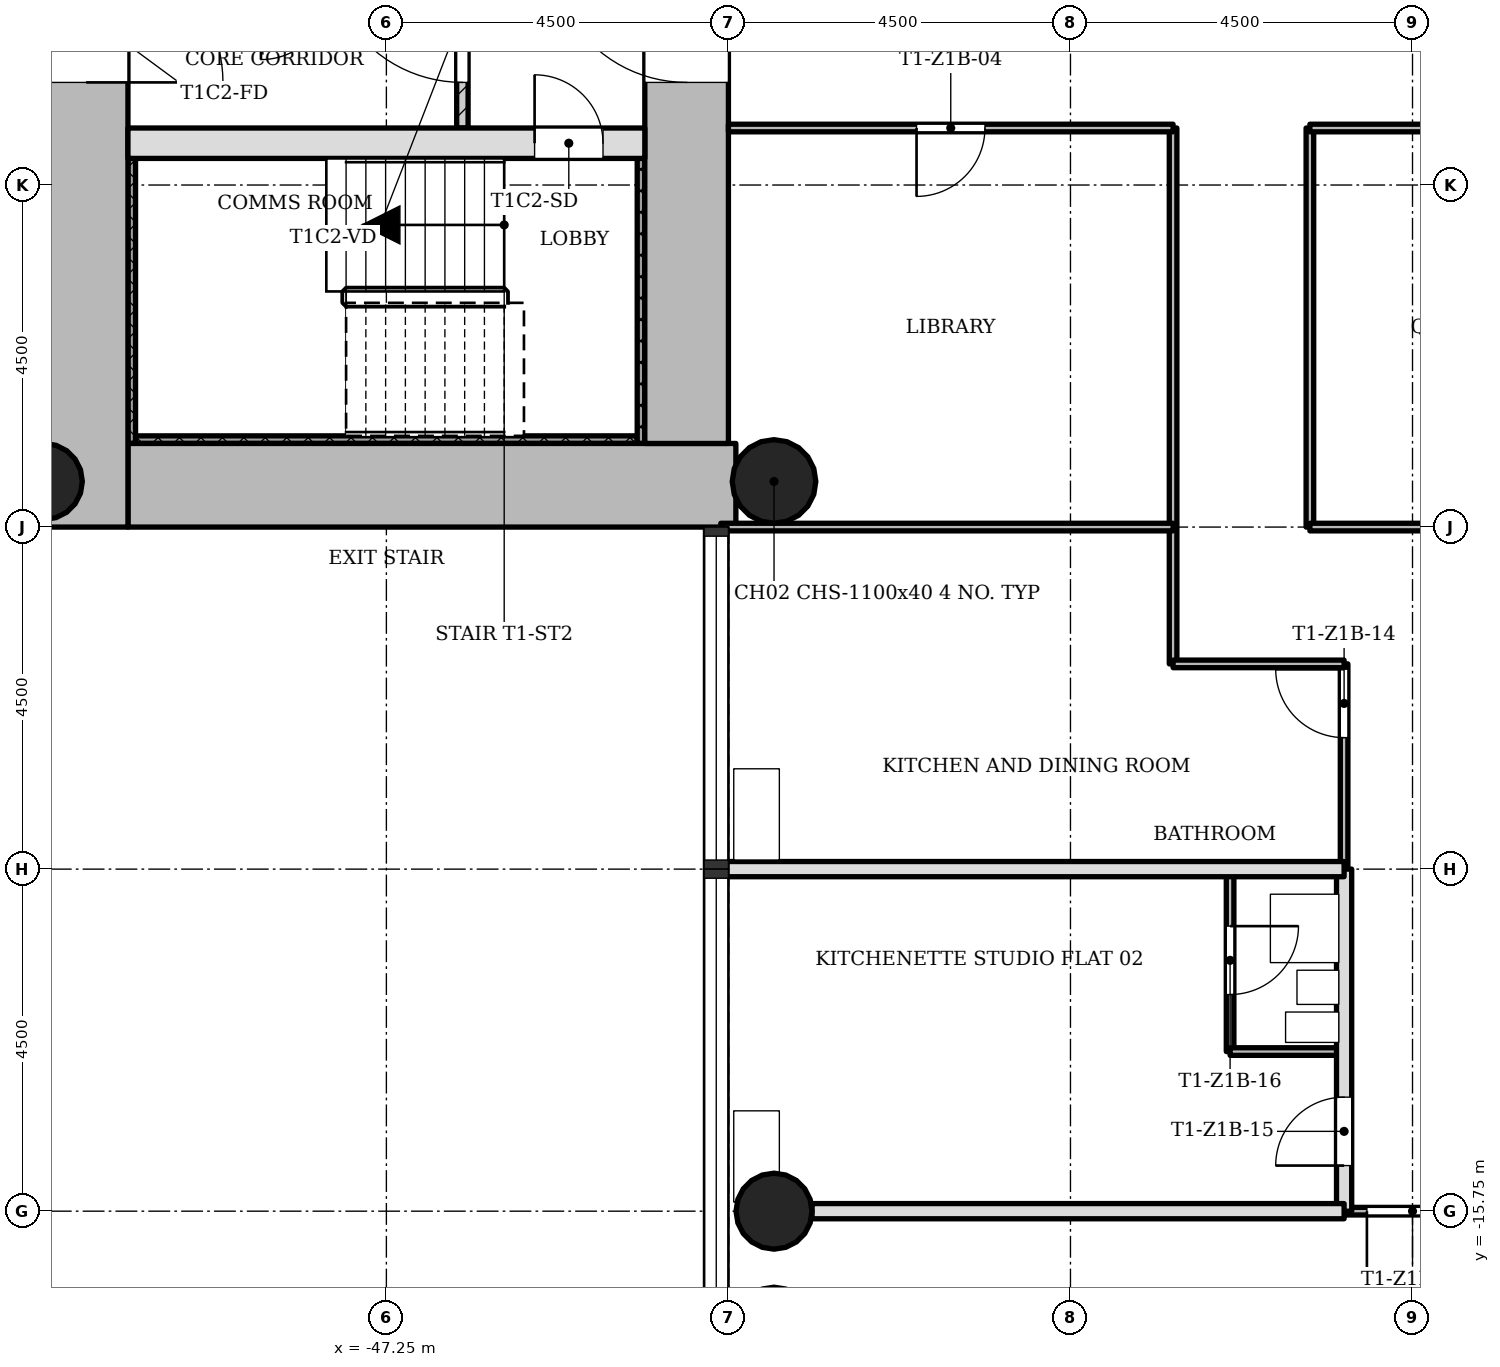
"""IFC4 building model, lengths in metres.
Left out: names, types, materials, properties, quantities, classifications, styles, units other than length and angle.
Written with IfcOpenShell. Run it as: python <this file> out.ifc"""

import sys

from ifc_helpers import new_model, si_unit, direction, frame, frame_2d, origin, origin_2d, place, context, subcontext, project, spatial, rectangle, hollow_circle, extrude, element, fill, save


model = new_model("IFC4")
c1 = context("Model", 3, precision=1e-05, world=origin(), true_north=direction((0.0, 1.0)))
c2 = subcontext(c1, "Body", "Model", "MODEL_VIEW")
j1 = project(units=[si_unit("LENGTHUNIT", "METRE"), si_unit("PLANEANGLEUNIT", "RADIAN")], contexts=[c1])
p1 = place(None, origin())
s1 = spatial("IfcSite", under=j1, at=p1, CompositionType="ELEMENT")
p2 = place(p1, origin())
s2 = spatial("IfcBuilding", under=s1, at=p2, CompositionType="ELEMENT")
p3 = place(p2, frame((0.0, 0.0, 41.5)))
s3 = spatial("IfcBuildingStorey", under=s2, at=p3, CompositionType="ELEMENT", Elevation=41.5)
p4 = place(p3, frame((-50.65, -6.2, 0.0), z_axis=(0.0, 0.0, 1.0), x_axis=(1.0, 0.0, 0.0)))
e1 = element("IfcWall", 1, at=p4, inside=s3, PredefinedType="SHEAR", context=c2, shape_type="SweptSolid", body=[
    extrude(rectangle(XDim=7.998, YDim=1.1, at=frame_2d((3.999, 0.0))), origin(), (0.0, 0.0, 1.0), 3.4),
])
p5 = place(p3, frame((-43.3, -5.65, 0.0), z_axis=(0.0, 0.0, 1.0), x_axis=(0.0, 1.0, 0.0)))
e2 = element("IfcWall", 2, at=p5, inside=s3, PredefinedType="SHEAR", context=c2, shape_type="SweptSolid", body=[
    extrude(rectangle(XDim=12.4, YDim=1.1, at=frame_2d((6.2, 0.0))), origin(), (0.0, 0.0, 1.0), 3.4),
])
p6 = place(p5, frame((4.75, 0.0, 0.0)))
e3 = element("IfcOpeningElement", 3, at=p6, cuts=e2, PredefinedType="OPENING", context=c2, shape_type="SweptSolid", body=[
    extrude(rectangle(XDim=1.8, YDim=2.1, at=frame_2d((0.9, 1.05))), frame((0.0, 0.56, 0.0), z_axis=(0.0, -1.0, 0.0), x_axis=(1.0, 0.0, 0.0)), (0.0, 0.0, 1.0), 1.12),
])
p7 = place(p3, frame((-51.2, 5.65, 0.0), z_axis=(0.0, 0.0, 1.0), x_axis=(0.0, -1.0, 0.0)))
e4 = element("IfcWall", 4, at=p7, inside=s3, PredefinedType="SHEAR", context=c2, shape_type="SweptSolid", body=[
    extrude(rectangle(XDim=12.4, YDim=1.1, at=frame_2d((6.2, 0.0))), origin(), (0.0, 0.0, 1.0), 3.4),
])
p8 = place(p7, frame((4.75, 0.0, 0.0)))
e5 = element("IfcOpeningElement", 5, at=p8, cuts=e4, PredefinedType="OPENING", context=c2, shape_type="SweptSolid", body=[
    extrude(rectangle(XDim=1.8, YDim=2.1, at=frame_2d((0.9, 1.05))), frame((0.0, 0.56, 0.0), z_axis=(0.0, -1.0, 0.0), x_axis=(1.0, 0.0, 0.0)), (0.0, 0.0, 1.0), 1.12),
])
p9 = place(p3, frame((-50.65, -1.7, 0.0), z_axis=(0.0, 0.0, 1.0), x_axis=(1.0, 0.0, 0.0)))
e6 = element("IfcWall", 6, at=p9, inside=s3, PredefinedType="SHEAR", context=c2, shape_type="SweptSolid", body=[
    extrude(rectangle(XDim=6.8, YDim=0.4, at=frame_2d((3.4, 0.0))), origin(), (0.0, 0.0, 1.0), 3.4),
])
p10 = place(p9, frame((5.35, 0.0, 0.0)))
e7 = element("IfcOpeningElement", 7, at=p10, cuts=e6, PredefinedType="OPENING", context=c2, shape_type="SweptSolid", body=[
    extrude(rectangle(XDim=0.9, YDim=2.1, at=frame_2d((0.45, 1.05))), frame((0.0, 0.21, 0.0), z_axis=(0.0, -1.0, 0.0), x_axis=(1.0, 0.0, 0.0)), (0.0, 0.0, 1.0), 0.42),
])
for number, where, z_axis, x_axis in (
    (8, (-51.75, -6.15, 0.0), (0.0, 0.0, 1.0), (1.0, 0.0, 0.0)),
    (9, (-42.15, -15.75, 0.0), (0.0, 0.0, 1.0), (1.0, 0.0, 0.0)),
):
    element("IfcColumn", number, at=place(p3, frame(where, z_axis=z_axis, x_axis=x_axis)), inside=s3, PredefinedType="COLUMN", context=c2, shape_type="SweptSolid", body=[
        extrude(hollow_circle(Radius=0.5, WallThickness=0.036, at=origin_2d()), origin(), (0.0, 0.0, 1.0), 3.4),
    ])
p11 = place(p3, frame((-42.15, -6.15, 0.0), z_axis=(0.0, 0.0, 1.0), x_axis=(1.0, 0.0, 0.0)))
e10 = element("IfcColumn", 10, at=p11, inside=s3, PredefinedType="COLUMN", context=c2, shape_type="SweptSolid", body=[
    extrude(hollow_circle(Radius=0.55, WallThickness=0.04, at=origin_2d()), origin(), (0.0, 0.0, 1.0), 3.4),
])
p12 = place(p3, frame((-46.25, 1.5, 0.0), z_axis=(0.0, 0.0, 1.0), x_axis=(0.0, -1.0, 0.0)))
e11 = element("IfcWall", 11, at=p12, inside=s3, PredefinedType="PARTITIONING", context=c2, shape_type="SweptSolid", body=[
    extrude(rectangle(XDim=3.0, YDim=0.15, at=frame_2d((1.5, 0.0))), origin(), (0.0, 0.0, 1.0), 3.0),
])
p13 = place(p12, frame((0.6, 0.0, 0.0)))
e12 = element("IfcOpeningElement", 12, at=p13, cuts=e11, PredefinedType="OPENING", context=c2, shape_type="SweptSolid", body=[
    extrude(rectangle(XDim=1.8, YDim=2.1, at=frame_2d((0.9, 1.05))), frame((0.0, 0.085, 0.0), z_axis=(0.0, -1.0, 0.0), x_axis=(1.0, 0.0, 0.0)), (0.0, 0.0, 1.0), 0.17),
])
p14 = place(p3, frame((-36.9, -8.55, 0.0), z_axis=(0.0, 0.0, 1.0), x_axis=(0.0, 1.0, 0.0)))
e13 = element("IfcWall", 13, at=p14, inside=s3, PredefinedType="PARTITIONING", context=c2, shape_type="SweptSolid", body=[
    extrude(rectangle(XDim=7.05, YDim=0.1, at=frame_2d((3.525, 0.0))), origin(), (0.0, 0.0, 1.0), 3.0),
])
p15 = place(p3, frame((-36.15, -13.65, 0.0), z_axis=(0.0, 0.0, 1.0), x_axis=(0.0, 1.0, 0.0)))
e14 = element("IfcWall", 14, at=p15, inside=s3, PredefinedType="PARTITIONING", context=c2, shape_type="SweptSolid", body=[
    extrude(rectangle(XDim=2.4, YDim=0.1, at=frame_2d((1.2, 0.0))), origin(), (0.0, 0.0, 1.0), 3.0),
])
p16 = place(p15, frame((0.75, 0.0, 0.0)))
e15 = element("IfcOpeningElement", 15, at=p16, cuts=e14, PredefinedType="OPENING", context=c2, shape_type="SweptSolid", body=[
    extrude(rectangle(XDim=0.9, YDim=2.1, at=frame_2d((0.45, 1.05))), frame((0.0, 0.06, 0.0), z_axis=(0.0, -1.0, 0.0), x_axis=(1.0, 0.0, 0.0)), (0.0, 0.0, 1.0), 0.12),
])
p17 = place(p3, frame((-35.1, -6.75, 0.0), z_axis=(0.0, 0.0, 1.0), x_axis=(0.0, 1.0, 0.0)))
e16 = element("IfcWall", 16, at=p17, inside=s3, PredefinedType="PARTITIONING", context=c2, shape_type="SweptSolid", body=[
    extrude(rectangle(XDim=5.25, YDim=0.1, at=frame_2d((2.625, 0.0))), origin(), (0.0, 0.0, 1.0), 3.0),
])
p18 = place(p3, frame((-34.65, -11.25, 0.0), z_axis=(0.0, 0.0, 1.0), x_axis=(0.0, 1.0, 0.0)))
e17 = element("IfcWall", 17, at=p18, inside=s3, PredefinedType="PARTITIONING", context=c2, shape_type="SweptSolid", body=[
    extrude(rectangle(XDim=2.7, YDim=0.1, at=frame_2d((1.35, 0.0))), origin(), (0.0, 0.0, 1.0), 3.0),
])
p19 = place(p18, frame((1.73, 0.0, 0.0)))
e18 = element("IfcOpeningElement", 18, at=p19, cuts=e17, PredefinedType="OPENING", context=c2, shape_type="SweptSolid", body=[
    extrude(rectangle(XDim=0.9, YDim=2.1, at=frame_2d((0.45, 1.05))), frame((0.0, 0.06, 0.0), z_axis=(0.0, -1.0, 0.0), x_axis=(1.0, 0.0, 0.0)), (0.0, 0.0, 1.0), 0.12),
])
p20 = place(p3, frame((-34.65, -15.75, 0.0), z_axis=(0.0, 0.0, 1.0), x_axis=(0.0, 1.0, 0.0)))
e19 = element("IfcWall", 19, at=p20, inside=s3, PredefinedType="SOLIDWALL", context=c2, shape_type="SweptSolid", body=[
    extrude(rectangle(XDim=4.5, YDim=0.2, at=frame_2d((2.25, 0.0))), origin(), (0.0, 0.0, 1.0), 3.0),
])
p21 = place(p20, frame((0.6, 0.0, 0.0)))
e20 = element("IfcOpeningElement", 20, at=p21, cuts=e19, PredefinedType="OPENING", context=c2, shape_type="SweptSolid", body=[
    extrude(rectangle(XDim=0.9, YDim=2.1, at=frame_2d((0.45, 1.05))), frame((0.0, 0.11, 0.0), z_axis=(0.0, -1.0, 0.0), x_axis=(1.0, 0.0, 0.0)), (0.0, 0.0, 1.0), 0.22),
])
p22 = place(p3, frame((-34.65, -15.75, 0.0), z_axis=(0.0, 0.0, 1.0), x_axis=(1.0, 0.0, 0.0)))
e21 = element("IfcWall", 21, at=p22, inside=s3, PredefinedType="PARTITIONING", context=c2, shape_type="SweptSolid", body=[
    extrude(rectangle(XDim=4.3, YDim=0.1, at=frame_2d((2.15, 0.0))), origin(), (0.0, 0.0, 1.0), 3.0),
])
p23 = place(p22, frame((0.3, 0.0, 0.0)))
e22 = element("IfcOpeningElement", 22, at=p23, cuts=e21, PredefinedType="OPENING", context=c2, shape_type="SweptSolid", body=[
    extrude(rectangle(XDim=1.2, YDim=2.1, at=frame_2d((0.6, 1.05))), frame((0.0, 0.06, 0.0), z_axis=(0.0, -1.0, 0.0), x_axis=(1.0, 0.0, 0.0)), (0.0, 0.0, 1.0), 0.12),
])
p24 = place(p3, frame((-41.65, -15.75, 0.0), z_axis=(0.0, 0.0, 1.0), x_axis=(1.0, 0.0, 0.0)))
e23 = element("IfcWall", 23, at=p24, inside=s3, PredefinedType="SOLIDWALL", context=c2, shape_type="SweptSolid", body=[
    extrude(rectangle(XDim=7.0, YDim=0.2, at=frame_2d((3.5, 0.0))), origin(), (0.0, 0.0, 1.0), 3.0),
])
p25 = place(p3, frame((-36.15, -13.65, 0.0), z_axis=(0.0, 0.0, 1.0), x_axis=(1.0, 0.0, 0.0)))
e24 = element("IfcWall", 24, at=p25, inside=s3, PredefinedType="PARTITIONING", context=c2, shape_type="SweptSolid", body=[
    extrude(rectangle(XDim=1.5, YDim=0.1, at=frame_2d((0.75, 0.0))), origin(), (0.0, 0.0, 1.0), 3.0),
])
p26 = place(p3, frame((-42.85, -11.25, 0.0), z_axis=(0.0, 0.0, 1.0), x_axis=(1.0, 0.0, 0.0)))
e25 = element("IfcWall", 25, at=p26, inside=s3, PredefinedType="SOLIDWALL", context=c2, shape_type="SweptSolid", body=[
    extrude(rectangle(XDim=8.2, YDim=0.2, at=frame_2d((4.1, 0.0))), origin(), (0.0, 0.0, 1.0), 3.0),
])
p27 = place(p3, frame((-36.9, -8.55, 0.0), z_axis=(0.0, 0.0, 1.0), x_axis=(1.0, 0.0, 0.0)))
e26 = element("IfcWall", 26, at=p27, inside=s3, PredefinedType="PARTITIONING", context=c2, shape_type="SweptSolid", body=[
    extrude(rectangle(XDim=2.25, YDim=0.1, at=frame_2d((1.125, 0.0))), origin(), (0.0, 0.0, 1.0), 3.0),
])
for number, where, z_axis, x_axis in (
    (27, (-42.85, -6.75, 0.0), (0.0, 0.0, 1.0), (1.0, 0.0, 0.0)),
    (28, (-35.1, -6.75, 0.0), (0.0, 0.0, 1.0), (1.0, 0.0, 0.0)),
):
    element("IfcWall", number, at=place(p3, frame(where, z_axis=z_axis, x_axis=x_axis)), inside=s3, PredefinedType="PARTITIONING", context=c2, shape_type="SweptSolid", body=[
        extrude(rectangle(XDim=5.95, YDim=0.1, at=frame_2d((2.975, 0.0))), origin(), (0.0, 0.0, 1.0), 3.0),
    ])
p28 = place(p3, frame((-42.75, -1.5, 0.0), z_axis=(0.0, 0.0, 1.0), x_axis=(1.0, 0.0, 0.0)))
e29 = element("IfcWall", 29, at=p28, inside=s3, PredefinedType="PARTITIONING", context=c2, shape_type="SweptSolid", body=[
    extrude(rectangle(XDim=5.85, YDim=0.1, at=frame_2d((2.925, 0.0))), origin(), (0.0, 0.0, 1.0), 3.0),
])
p29 = place(p28, frame((2.475, 0.0, 0.0)))
e30 = element("IfcOpeningElement", 30, at=p29, cuts=e29, PredefinedType="OPENING", context=c2, shape_type="SweptSolid", body=[
    extrude(rectangle(XDim=0.9, YDim=2.1, at=frame_2d((0.45, 1.05))), frame((0.0, 0.06, 0.0), z_axis=(0.0, -1.0, 0.0), x_axis=(1.0, 0.0, 0.0)), (0.0, 0.0, 1.0), 0.12),
])
p30 = place(p3, frame((-35.1, -1.5, 0.0), z_axis=(0.0, 0.0, 1.0), x_axis=(1.0, 0.0, 0.0)))
e31 = element("IfcWall", 31, at=p30, inside=s3, PredefinedType="PARTITIONING", context=c2, shape_type="SweptSolid", body=[
    extrude(rectangle(XDim=5.85, YDim=0.1, at=frame_2d((2.925, 0.0))), origin(), (0.0, 0.0, 1.0), 3.0),
])
p31 = place(p30, frame((2.475, 0.0, 0.0)))
e32 = element("IfcOpeningElement", 32, at=p31, cuts=e31, PredefinedType="OPENING", context=c2, shape_type="SweptSolid", body=[
    extrude(rectangle(XDim=0.9, YDim=2.1, at=frame_2d((0.45, 1.05))), frame((0.0, 0.06, 0.0), z_axis=(0.0, -1.0, 0.0), x_axis=(1.0, 0.0, 0.0)), (0.0, 0.0, 1.0), 0.12),
])
p32 = place(p3, frame((-50.6, -1.9, 0.0), z_axis=(0.0, 0.0, 1.0), x_axis=(0.0, -1.0, 0.0)))
e33 = element("IfcWall", 33, at=p32, inside=s3, PredefinedType="SHEAR", context=c2, shape_type="SweptSolid", body=[
    extrude(rectangle(XDim=3.75, YDim=0.1, at=frame_2d((1.875, 0.0))), origin(), (0.0, 0.0, 1.0), 3.4),
])
p33 = place(p3, frame((-43.95, -5.6, 0.0), z_axis=(0.0, 0.0, 1.0), x_axis=(-1.0, 0.0, 0.0)))
e34 = element("IfcWall", 34, at=p33, inside=s3, PredefinedType="SHEAR", context=c2, shape_type="SweptSolid", body=[
    extrude(rectangle(XDim=6.6, YDim=0.1, at=frame_2d((3.3, 0.0))), origin(), (0.0, 0.0, 1.0), 3.4),
])
p34 = place(p3, frame((-43.9, -1.9, 0.0), z_axis=(0.0, 0.0, 1.0), x_axis=(0.0, -1.0, 0.0)))
e35 = element("IfcWall", 35, at=p34, inside=s3, PredefinedType="SHEAR", context=c2, shape_type="SweptSolid", body=[
    extrude(rectangle(XDim=3.75, YDim=0.1, at=frame_2d((1.875, 0.0))), origin(), (0.0, 0.0, 1.0), 3.4),
])
p35 = place(p13, origin())
e36 = element("IfcDoor", 36, at=p35, inside=s3, OperationType="SINGLE_SWING_LEFT", PredefinedType="DOOR", context=c2, shape_type="SweptSolid", body=[
    extrude(rectangle(XDim=1.8, YDim=2.1, at=frame_2d((0.9, 1.05))), frame((0.0, 0.025, 0.0), z_axis=(0.0, -1.0, 0.0), x_axis=(1.0, 0.0, 0.0)), (0.0, 0.0, 1.0), 0.05),
])
fill(e12, e36)
p36 = place(p29, origin())
e37 = element("IfcDoor", 37, at=p36, inside=s3, OperationType="SINGLE_SWING_LEFT", PredefinedType="DOOR", context=c2, shape_type="SweptSolid", body=[
    extrude(rectangle(XDim=0.9, YDim=2.1, at=frame_2d((0.45, 1.05))), frame((0.0, 0.025, 0.0), z_axis=(0.0, -1.0, 0.0), x_axis=(1.0, 0.0, 0.0)), (0.0, 0.0, 1.0), 0.05),
])
fill(e30, e37)
p37 = place(p19, origin())
e38 = element("IfcDoor", 38, at=p37, inside=s3, OperationType="SINGLE_SWING_LEFT", PredefinedType="DOOR", context=c2, shape_type="SweptSolid", body=[
    extrude(rectangle(XDim=0.9, YDim=2.1, at=frame_2d((0.45, 1.05))), frame((0.0, 0.025, 0.0), z_axis=(0.0, -1.0, 0.0), x_axis=(1.0, 0.0, 0.0)), (0.0, 0.0, 1.0), 0.05),
])
fill(e18, e38)
p38 = place(p21, origin())
e39 = element("IfcDoor", 39, at=p38, inside=s3, OperationType="SINGLE_SWING_RIGHT", PredefinedType="DOOR", context=c2, shape_type="SweptSolid", body=[
    extrude(rectangle(XDim=0.9, YDim=2.1, at=frame_2d((0.45, 1.05))), frame((0.0, 0.025, 0.0), z_axis=(0.0, -1.0, 0.0), x_axis=(1.0, 0.0, 0.0)), (0.0, 0.0, 1.0), 0.05),
])
fill(e20, e39)
p39 = place(p16, origin())
e40 = element("IfcDoor", 40, at=p39, inside=s3, OperationType="SINGLE_SWING_RIGHT", PredefinedType="DOOR", context=c2, shape_type="SweptSolid", body=[
    extrude(rectangle(XDim=0.9, YDim=2.1, at=frame_2d((0.45, 1.05))), frame((0.0, 0.025, 0.0), z_axis=(0.0, -1.0, 0.0), x_axis=(1.0, 0.0, 0.0)), (0.0, 0.0, 1.0), 0.05),
])
fill(e15, e40)
p40 = place(p23, origin())
e41 = element("IfcDoor", 41, at=p40, inside=s3, OperationType="SINGLE_SWING_LEFT", PredefinedType="DOOR", context=c2, shape_type="SweptSolid", body=[
    extrude(rectangle(XDim=1.2, YDim=2.1, at=frame_2d((0.6, 1.05))), frame((0.0, 0.025, 0.0), z_axis=(0.0, -1.0, 0.0), x_axis=(1.0, 0.0, 0.0)), (0.0, 0.0, 1.0), 0.05),
])
fill(e22, e41)
p41 = place(p10, origin())
e42 = element("IfcDoor", 42, at=p41, inside=s3, OperationType="SINGLE_SWING_RIGHT", PredefinedType="DOOR", context=c2, shape_type="SweptSolid", body=[
    extrude(rectangle(XDim=0.9, YDim=2.1, at=frame_2d((0.45, 1.05))), frame((0.0, 0.025, 0.0), z_axis=(0.0, -1.0, 0.0), x_axis=(1.0, 0.0, 0.0)), (0.0, 0.0, 1.0), 0.05),
])
fill(e7, e42)
p42 = place(p6, origin())
e43 = element("IfcDoor", 43, at=p42, inside=s3, OperationType="SINGLE_SWING_LEFT", PredefinedType="DOOR", context=c2, shape_type="SweptSolid", body=[
    extrude(rectangle(XDim=1.8, YDim=2.1, at=frame_2d((0.9, 1.05))), frame((0.0, 0.025, 0.0), z_axis=(0.0, -1.0, 0.0), x_axis=(1.0, 0.0, 0.0)), (0.0, 0.0, 1.0), 0.05),
])
fill(e3, e43)
p43 = place(p8, origin())
e44 = element("IfcDoor", 44, at=p43, inside=s3, OperationType="SINGLE_SWING_LEFT", PredefinedType="DOOR", context=c2, shape_type="SweptSolid", body=[
    extrude(rectangle(XDim=1.8, YDim=2.1, at=frame_2d((0.9, 1.05))), frame((0.0, 0.025, 0.0), z_axis=(0.0, -1.0, 0.0), x_axis=(1.0, 0.0, 0.0)), (0.0, 0.0, 1.0), 0.05),
])
fill(e5, e44)
save(model, sys.argv[1])
